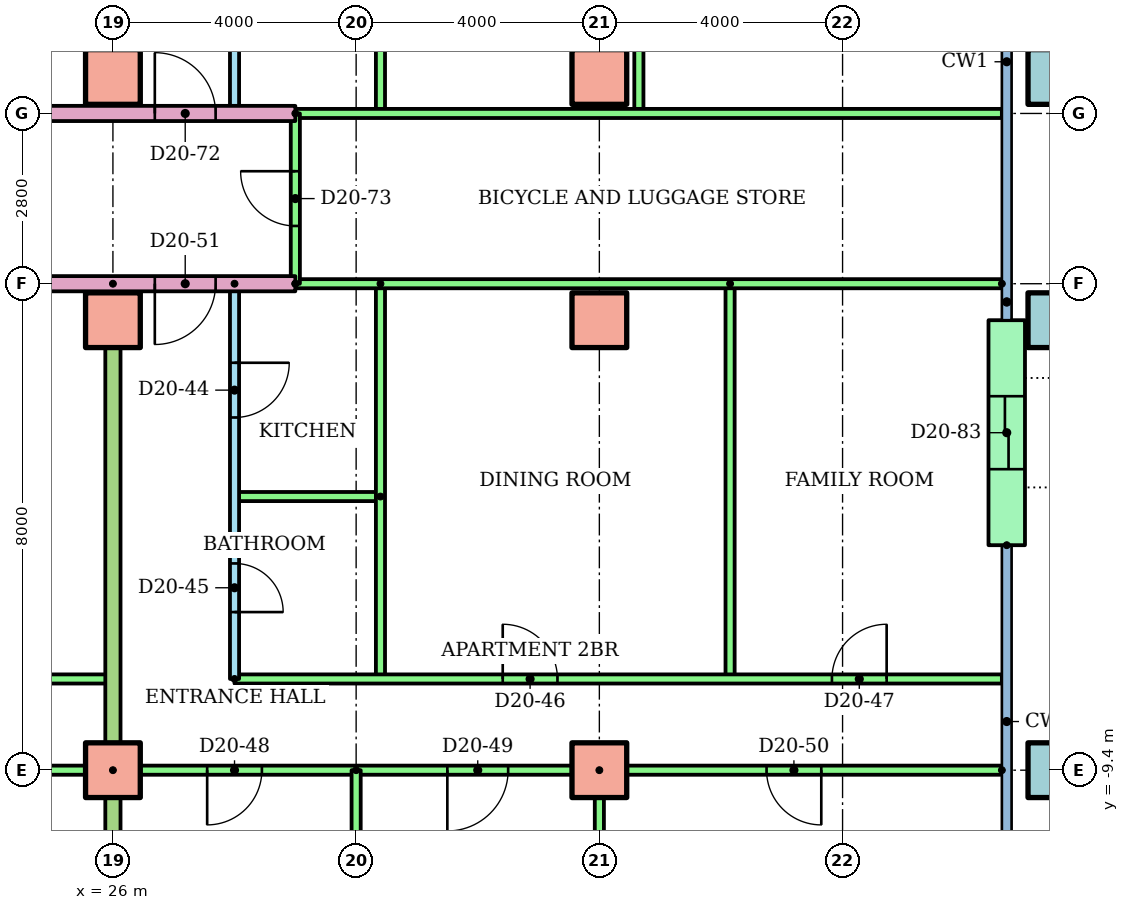
"""IFC4 building model, lengths in metres.
Left out: names, types, materials, properties, quantities, classifications, styles, units other than length and angle.
Written with IfcOpenShell. Run it as: python <this file> out.ifc"""

import sys

from ifc_helpers import new_model, si_unit, direction, frame, frame_2d, origin, origin_2d, place, context, subcontext, project, spatial, rectangle, hollow_rectangle, extrude, element, fill, save


model = new_model("IFC4")
c1 = context("Model", 3, precision=1e-05, world=origin(), true_north=direction((0.0, 1.0)))
c2 = subcontext(c1, "Body", "Model", "MODEL_VIEW")
j1 = project(units=[si_unit("LENGTHUNIT", "METRE"), si_unit("PLANEANGLEUNIT", "RADIAN")], contexts=[c1])
p1 = place(None, origin())
s1 = spatial("IfcSite", under=j1, at=p1, CompositionType="ELEMENT")
p2 = place(p1, origin())
s2 = spatial("IfcBuilding", under=s1, at=p2, CompositionType="ELEMENT")
p3 = place(p2, frame((0.0, 0.0, 80.7)))
s3 = spatial("IfcBuildingStorey", under=s2, at=p3, CompositionType="ELEMENT", Elevation=80.7)
for number, where in (
    (1, (26.0, -9.4, 0.0)),
    (2, (34.0, -9.4, 0.0)),
):
    element("IfcColumn", number, at=place(p3, frame(where)), inside=s3, PredefinedType="COLUMN", context=c2, shape_type="SweptSolid", body=[
        extrude(rectangle(XDim=0.9, YDim=0.9, at=origin_2d()), origin(), (0.0, 0.0, 1.0), 3.2),
    ])
p4 = place(p3, frame((41.5, -9.4, 0.0)))
e3 = element("IfcColumn", 3, at=p4, inside=s3, PredefinedType="COLUMN", context=c2, shape_type="SweptSolid", body=[
    extrude(hollow_rectangle(XDim=0.9, YDim=0.9, WallThickness=0.045, at=origin_2d()), origin(), (0.0, 0.0, 1.0), 3.2),
])
for number, where in (
    (4, (26.0, -2.0, 0.0)),
    (5, (34.0, -2.0, 0.0)),
):
    element("IfcColumn", number, at=place(p3, frame(where)), inside=s3, PredefinedType="COLUMN", context=c2, shape_type="SweptSolid", body=[
        extrude(rectangle(XDim=0.9, YDim=0.9, at=origin_2d()), origin(), (0.0, 0.0, 1.0), 3.2),
    ])
p5 = place(p3, frame((41.5, -2.0, 0.0)))
e6 = element("IfcColumn", 6, at=p5, inside=s3, PredefinedType="COLUMN", context=c2, shape_type="SweptSolid", body=[
    extrude(hollow_rectangle(XDim=0.9, YDim=0.9, WallThickness=0.045, at=origin_2d()), origin(), (0.0, 0.0, 1.0), 3.2),
])
for number, where in (
    (7, (26.0, 2.0, 0.0)),
    (8, (34.0, 2.0, 0.0)),
):
    element("IfcColumn", number, at=place(p3, frame(where)), inside=s3, PredefinedType="COLUMN", context=c2, shape_type="SweptSolid", body=[
        extrude(rectangle(XDim=0.9, YDim=0.9, at=origin_2d()), origin(), (0.0, 0.0, 1.0), 3.2),
    ])
p6 = place(p3, frame((41.5, 2.0, 0.0)))
e9 = element("IfcColumn", 9, at=p6, inside=s3, PredefinedType="COLUMN", context=c2, shape_type="SweptSolid", body=[
    extrude(hollow_rectangle(XDim=0.9, YDim=0.9, WallThickness=0.045, at=origin_2d()), origin(), (0.0, 0.0, 1.0), 3.2),
])
p7 = place(p3, frame((40.7, -5.7, 0.0), z_axis=(0.0, 0.0, 1.0), x_axis=(0.0, 1.0, 0.0)))
e10 = element("IfcWall", 10, at=p7, inside=s3, PredefinedType="STANDARD", context=c2, shape_type="SweptSolid", body=[
    extrude(rectangle(XDim=3.7, YDim=0.6, at=frame_2d((1.85, 0.0))), origin(), (0.0, 0.0, 1.0), 2.92),
])
p8 = place(p7, frame((1.25, 0.0, 0.0)))
e11 = element("IfcOpeningElement", 11, at=p8, cuts=e10, PredefinedType="OPENING", context=c2, shape_type="SweptSolid", body=[
    extrude(rectangle(XDim=1.2, YDim=2.1, at=frame_2d((0.6, 1.05))), frame((0.0, 0.31, 0.0), z_axis=(0.0, -1.0, 0.0), x_axis=(1.0, 0.0, 0.0)), (0.0, 0.0, 1.0), 0.62),
])
p9 = place(p3, frame((12.0, -7.9, 0.0)))
e12 = element("IfcWall", 12, at=p9, inside=s3, PredefinedType="PARTITIONING", context=c2, shape_type="SweptSolid", body=[
    extrude(rectangle(XDim=14.0, YDim=0.15, at=frame_2d((7.0, 0.0))), origin(), (0.0, 0.0, 1.0), 2.4),
])
p10 = place(p9, frame((3.45, 0.0, 0.0)))
e13 = element("IfcOpeningElement", 13, at=p10, cuts=e12, PredefinedType="OPENING", context=c2, shape_type="SweptSolid", body=[
    extrude(rectangle(XDim=0.9, YDim=2.1, at=frame_2d((0.45, 1.05))), frame((0.0, 0.085, 0.0), z_axis=(0.0, -1.0, 0.0), x_axis=(1.0, 0.0, 0.0)), (0.0, 0.0, 1.0), 0.17),
])
p11 = place(p9, frame((6.825, 0.0, 0.0)))
e14 = element("IfcOpeningElement", 14, at=p11, cuts=e12, PredefinedType="OPENING", context=c2, shape_type="SweptSolid", body=[
    extrude(rectangle(XDim=0.9, YDim=2.1, at=frame_2d((0.45, 1.05))), frame((0.0, 0.085, 0.0), z_axis=(0.0, -1.0, 0.0), x_axis=(1.0, 0.0, 0.0)), (0.0, 0.0, 1.0), 0.17),
])
p12 = place(p9, frame((11.125, 0.0, 0.0)))
e15 = element("IfcOpeningElement", 15, at=p12, cuts=e12, PredefinedType="OPENING", context=c2, shape_type="SweptSolid", body=[
    extrude(rectangle(XDim=0.9, YDim=2.1, at=frame_2d((0.45, 1.05))), frame((0.0, 0.085, 0.0), z_axis=(0.0, -1.0, 0.0), x_axis=(1.0, 0.0, 0.0)), (0.0, 0.0, 1.0), 0.17),
])
p13 = place(p3, frame((26.0, -9.4, 0.0), z_axis=(0.0, 0.0, 1.0), x_axis=(-1.0, 0.0, 0.0)))
e16 = element("IfcWall", 16, at=p13, inside=s3, PredefinedType="PARTITIONING", context=c2, shape_type="SweptSolid", body=[
    extrude(rectangle(XDim=16.0, YDim=0.15, at=frame_2d((8.0, 0.0))), origin(), (0.0, 0.0, 1.0), 2.4),
])
p14 = place(p13, frame((13.55, 0.0, 0.0)))
e17 = element("IfcOpeningElement", 17, at=p14, cuts=e16, PredefinedType="OPENING", context=c2, shape_type="SweptSolid", body=[
    extrude(rectangle(XDim=0.9, YDim=2.1, at=frame_2d((0.45, 1.05))), frame((0.0, 0.085, 0.0), z_axis=(0.0, -1.0, 0.0), x_axis=(1.0, 0.0, 0.0)), (0.0, 0.0, 1.0), 0.17),
])
p15 = place(p13, frame((9.55, 0.0, 0.0)))
e18 = element("IfcOpeningElement", 18, at=p15, cuts=e16, PredefinedType="OPENING", context=c2, shape_type="SweptSolid", body=[
    extrude(rectangle(XDim=0.9, YDim=2.1, at=frame_2d((0.45, 1.05))), frame((0.0, 0.085, 0.0), z_axis=(0.0, -1.0, 0.0), x_axis=(1.0, 0.0, 0.0)), (0.0, 0.0, 1.0), 0.17),
])
p16 = place(p13, frame((3.5, 0.0, 0.0)))
e19 = element("IfcOpeningElement", 19, at=p16, cuts=e16, PredefinedType="OPENING", context=c2, shape_type="SweptSolid", body=[
    extrude(rectangle(XDim=1.0, YDim=2.1, at=frame_2d((0.5, 1.05))), frame((0.0, 0.085, 0.0), z_axis=(0.0, -1.0, 0.0), x_axis=(1.0, 0.0, 0.0)), (0.0, 0.0, 1.0), 0.17),
])
p17 = place(p3, frame((28.0, -1.4, 0.0), z_axis=(0.0, 0.0, 1.0), x_axis=(0.0, -1.0, 0.0)))
e20 = element("IfcWall", 20, at=p17, inside=s3, PredefinedType="PARTITIONING", context=c2, shape_type="SweptSolid", body=[
    extrude(rectangle(XDim=6.5, YDim=0.15, at=frame_2d((3.25, 0.0))), origin(), (0.0, 0.0, 1.0), 2.4),
])
p18 = place(p17, frame((1.3, 0.0, 0.0)))
e21 = element("IfcOpeningElement", 21, at=p18, cuts=e20, PredefinedType="OPENING", context=c2, shape_type="SweptSolid", body=[
    extrude(rectangle(XDim=0.9, YDim=2.1, at=frame_2d((0.45, 1.05))), frame((0.0, 0.085, 0.0), z_axis=(0.0, -1.0, 0.0), x_axis=(1.0, 0.0, 0.0)), (0.0, 0.0, 1.0), 0.17),
])
p19 = place(p17, frame((4.6, 0.0, 0.0)))
e22 = element("IfcOpeningElement", 22, at=p19, cuts=e20, PredefinedType="OPENING", context=c2, shape_type="SweptSolid", body=[
    extrude(rectangle(XDim=0.8, YDim=2.1, at=frame_2d((0.4, 1.05))), frame((0.0, 0.085, 0.0), z_axis=(0.0, -1.0, 0.0), x_axis=(1.0, 0.0, 0.0)), (0.0, 0.0, 1.0), 0.17),
])
p20 = place(p3, frame((30.4, -4.9, 0.0), z_axis=(0.0, 0.0, 1.0), x_axis=(-1.0, 0.0, 0.0)))
e23 = element("IfcWall", 23, at=p20, inside=s3, PredefinedType="PARTITIONING", context=c2, shape_type="SweptSolid", body=[
    extrude(rectangle(XDim=2.4, YDim=0.15, at=frame_2d((1.2, 0.0))), origin(), (0.0, 0.0, 1.0), 2.4),
])
for number, where, z_axis, x_axis in (
    (24, (30.4, -1.4, 0.0), (0.0, 0.0, 1.0), (0.0, -1.0, 0.0)),
    (25, (36.15, -1.4, 0.0), (0.0, 0.0, 1.0), (0.0, -1.0, 0.0)),
):
    element("IfcWall", number, at=place(p3, frame(where, z_axis=z_axis, x_axis=x_axis)), inside=s3, PredefinedType="PARTITIONING", context=c2, shape_type="SweptSolid", body=[
        extrude(rectangle(XDim=6.5, YDim=0.15, at=frame_2d((3.25, 0.0))), origin(), (0.0, 0.0, 1.0), 2.4),
    ])
p21 = place(p3, frame((28.0, -7.9, 0.0)))
e26 = element("IfcWall", 26, at=p21, inside=s3, PredefinedType="PARTITIONING", context=c2, shape_type="SweptSolid", body=[
    extrude(rectangle(XDim=12.62, YDim=0.15, at=frame_2d((6.31, 0.0))), origin(), (0.0, 0.0, 1.0), 2.4),
])
p22 = place(p21, frame((4.411, 0.0, 0.0)))
e27 = element("IfcOpeningElement", 27, at=p22, cuts=e26, PredefinedType="OPENING", context=c2, shape_type="SweptSolid", body=[
    extrude(rectangle(XDim=0.9, YDim=2.1, at=frame_2d((0.45, 1.05))), frame((0.0, 0.085, 0.0), z_axis=(0.0, -1.0, 0.0), x_axis=(1.0, 0.0, 0.0)), (0.0, 0.0, 1.0), 0.17),
])
p23 = place(p21, frame((9.825, 0.0, 0.0)))
e28 = element("IfcOpeningElement", 28, at=p23, cuts=e26, PredefinedType="OPENING", context=c2, shape_type="SweptSolid", body=[
    extrude(rectangle(XDim=0.9, YDim=2.1, at=frame_2d((0.45, 1.05))), frame((0.0, 0.085, 0.0), z_axis=(0.0, -1.0, 0.0), x_axis=(1.0, 0.0, 0.0)), (0.0, 0.0, 1.0), 0.17),
])
p24 = place(p3, frame((40.62, -9.4, 0.0), z_axis=(0.0, 0.0, 1.0), x_axis=(-1.0, 0.0, 0.0)))
e29 = element("IfcWall", 29, at=p24, inside=s3, PredefinedType="PARTITIONING", context=c2, shape_type="SweptSolid", body=[
    extrude(rectangle(XDim=14.62, YDim=0.15, at=frame_2d((7.31, 0.0))), origin(), (0.0, 0.0, 1.0), 2.4),
])
p25 = place(p24, frame((12.17, 0.0, 0.0)))
e30 = element("IfcOpeningElement", 30, at=p25, cuts=e29, PredefinedType="OPENING", context=c2, shape_type="SweptSolid", body=[
    extrude(rectangle(XDim=0.9, YDim=2.1, at=frame_2d((0.45, 1.05))), frame((0.0, 0.085, 0.0), z_axis=(0.0, -1.0, 0.0), x_axis=(1.0, 0.0, 0.0)), (0.0, 0.0, 1.0), 0.17),
])
p26 = place(p24, frame((8.12, 0.0, 0.0)))
e31 = element("IfcOpeningElement", 31, at=p26, cuts=e29, PredefinedType="OPENING", context=c2, shape_type="SweptSolid", body=[
    extrude(rectangle(XDim=1.0, YDim=2.1, at=frame_2d((0.5, 1.05))), frame((0.0, 0.085, 0.0), z_axis=(0.0, -1.0, 0.0), x_axis=(1.0, 0.0, 0.0)), (0.0, 0.0, 1.0), 0.17),
])
p27 = place(p24, frame((2.97, 0.0, 0.0)))
e32 = element("IfcOpeningElement", 32, at=p27, cuts=e29, PredefinedType="OPENING", context=c2, shape_type="SweptSolid", body=[
    extrude(rectangle(XDim=0.9, YDim=2.1, at=frame_2d((0.45, 1.05))), frame((0.0, 0.085, 0.0), z_axis=(0.0, -1.0, 0.0), x_axis=(1.0, 0.0, 0.0)), (0.0, 0.0, 1.0), 0.17),
])
p28 = place(p3, frame((30.0, -9.4, 0.0), z_axis=(0.0, 0.0, 1.0), x_axis=(0.0, -1.0, 0.0)))
e33 = element("IfcWall", 33, at=p28, inside=s3, PredefinedType="PARTITIONING", context=c2, shape_type="SweptSolid", body=[
    extrude(rectangle(XDim=6.821, YDim=0.15, at=frame_2d((3.411, 0.0))), origin(), (0.0, 0.0, 1.0), 2.4),
])
p29 = place(p3, frame((34.0, -9.4, 0.0), z_axis=(0.0, 0.0, 1.0), x_axis=(0.0, -1.0, 0.0)))
e34 = element("IfcWall", 34, at=p29, inside=s3, PredefinedType="PARTITIONING", context=c2, shape_type="SweptSolid", body=[
    extrude(rectangle(XDim=6.81, YDim=0.15, at=frame_2d((3.405, 0.0))), origin(), (0.0, 0.0, 1.0), 2.4),
])
p30 = place(p3, frame((26.0, -1.4, 0.0), z_axis=(0.0, 0.0, 1.0), x_axis=(0.0, -1.0, 0.0)))
e35 = element("IfcWall", 35, at=p30, inside=s3, PredefinedType="PARTITIONING", context=c2, shape_type="SweptSolid", body=[
    extrude(rectangle(XDim=14.81, YDim=0.25, at=frame_2d((7.405, 0.0))), origin(), (0.0, 0.0, 1.0), 2.4),
])
p31 = place(p3, frame((29.0, -1.4, 0.0), z_axis=(0.0, 0.0, 1.0), x_axis=(-1.0, 0.0, 0.0)))
e36 = element("IfcWall", 36, at=p31, inside=s3, PredefinedType="PARTITIONING", context=c2, shape_type="SweptSolid", body=[
    extrude(rectangle(XDim=15.0, YDim=0.25, at=frame_2d((7.5, 0.0))), origin(), (0.0, 0.0, 1.0), 2.4),
])
p32 = place(p31, frame((1.311, 0.0, 0.0)))
e37 = element("IfcOpeningElement", 37, at=p32, cuts=e36, PredefinedType="OPENING", context=c2, shape_type="SweptSolid", body=[
    extrude(rectangle(XDim=1.0, YDim=2.1, at=frame_2d((0.5, 1.05))), frame((0.0, 0.135, 0.0), z_axis=(0.0, -1.0, 0.0), x_axis=(1.0, 0.0, 0.0)), (0.0, 0.0, 1.0), 0.27),
])
p33 = place(p3, frame((40.62, -1.4, 0.0), z_axis=(0.0, 0.0, 1.0), x_axis=(-1.0, 0.0, 0.0)))
e38 = element("IfcWall", 38, at=p33, inside=s3, PredefinedType="PARTITIONING", context=c2, shape_type="SweptSolid", body=[
    extrude(rectangle(XDim=11.62, YDim=0.15, at=frame_2d((5.81, 0.0))), origin(), (0.0, 0.0, 1.0), 2.4),
])
p34 = place(p3, frame((28.0, 10.3, 0.0), z_axis=(0.0, 0.0, 1.0), x_axis=(0.0, -1.0, 0.0)))
e39 = element("IfcWall", 39, at=p34, inside=s3, PredefinedType="PARTITIONING", context=c2, shape_type="SweptSolid", body=[
    extrude(rectangle(XDim=8.9, YDim=0.15, at=frame_2d((4.45, 0.0))), origin(), (0.0, 0.0, 1.0), 2.4),
])
p35 = place(p34, frame((5.95, 0.0, 0.0)))
e40 = element("IfcOpeningElement", 40, at=p35, cuts=e39, PredefinedType="OPENING", context=c2, shape_type="SweptSolid", body=[
    extrude(rectangle(XDim=0.9, YDim=2.1, at=frame_2d((0.45, 1.05))), frame((0.0, 0.085, 0.0), z_axis=(0.0, -1.0, 0.0), x_axis=(1.0, 0.0, 0.0)), (0.0, 0.0, 1.0), 0.17),
])
p36 = place(p34, frame((1.55, 0.0, 0.0)))
e41 = element("IfcOpeningElement", 41, at=p36, cuts=e39, PredefinedType="OPENING", context=c2, shape_type="SweptSolid", body=[
    extrude(rectangle(XDim=0.8, YDim=2.1, at=frame_2d((0.4, 1.05))), frame((0.0, 0.085, 0.0), z_axis=(0.0, -1.0, 0.0), x_axis=(1.0, 0.0, 0.0)), (0.0, 0.0, 1.0), 0.17),
])
for number, where, z_axis, x_axis in (
    (42, (30.4, 10.3, 0.0), (0.0, 0.0, 1.0), (0.0, -1.0, 0.0)),
    (43, (34.65, 10.3, 0.0), (0.0, 0.0, 1.0), (0.0, -1.0, 0.0)),
):
    element("IfcWall", number, at=place(p3, frame(where, z_axis=z_axis, x_axis=x_axis)), inside=s3, PredefinedType="PARTITIONING", context=c2, shape_type="SweptSolid", body=[
        extrude(rectangle(XDim=8.9, YDim=0.15, at=frame_2d((4.45, 0.0))), origin(), (0.0, 0.0, 1.0), 2.4),
    ])
p37 = place(p3, frame((26.0, 18.621, 0.0), z_axis=(0.0, 0.0, 1.0), x_axis=(0.0, -1.0, 0.0)))
e44 = element("IfcWall", 44, at=p37, inside=s3, PredefinedType="PARTITIONING", context=c2, shape_type="SweptSolid", body=[
    extrude(rectangle(XDim=17.221, YDim=0.25, at=frame_2d((8.611, 0.0))), origin(), (0.0, 0.0, 1.0), 2.4),
])
p38 = place(p3, frame((14.0, 1.4, 0.0)))
e45 = element("IfcWall", 45, at=p38, inside=s3, PredefinedType="PARTITIONING", context=c2, shape_type="SweptSolid", body=[
    extrude(rectangle(XDim=15.0, YDim=0.25, at=frame_2d((7.5, 0.0))), origin(), (0.0, 0.0, 1.0), 2.4),
])
p39 = place(p38, frame((0.5, 0.0, 0.0)))
e46 = element("IfcOpeningElement", 46, at=p39, cuts=e45, PredefinedType="OPENING", context=c2, shape_type="SweptSolid", body=[
    extrude(rectangle(XDim=1.0, YDim=2.1, at=frame_2d((0.5, 1.05))), frame((0.0, 0.135, 0.0), z_axis=(0.0, -1.0, 0.0), x_axis=(1.0, 0.0, 0.0)), (0.0, 0.0, 1.0), 0.27),
])
p40 = place(p38, frame((12.689, 0.0, 0.0)))
e47 = element("IfcOpeningElement", 47, at=p40, cuts=e45, PredefinedType="OPENING", context=c2, shape_type="SweptSolid", body=[
    extrude(rectangle(XDim=1.0, YDim=2.1, at=frame_2d((0.5, 1.05))), frame((0.0, 0.135, 0.0), z_axis=(0.0, -1.0, 0.0), x_axis=(1.0, 0.0, 0.0)), (0.0, 0.0, 1.0), 0.27),
])
p41 = place(p3, frame((29.0, 1.4, 0.0)))
e48 = element("IfcWall", 48, at=p41, inside=s3, PredefinedType="PARTITIONING", context=c2, shape_type="SweptSolid", body=[
    extrude(rectangle(XDim=11.62, YDim=0.15, at=frame_2d((5.81, 0.0))), origin(), (0.0, 0.0, 1.0), 2.4),
])
p42 = place(p3, frame((29.0, -1.4, 0.0), z_axis=(0.0, 0.0, 1.0), x_axis=(0.0, 1.0, 0.0)))
e49 = element("IfcWall", 49, at=p42, inside=s3, PredefinedType="PARTITIONING", context=c2, shape_type="SweptSolid", body=[
    extrude(rectangle(XDim=2.8, YDim=0.15, at=frame_2d((1.4, 0.0))), origin(), (0.0, 0.0, 1.0), 2.4),
])
p43 = place(p42, frame((0.95, 0.0, 0.0)))
e50 = element("IfcOpeningElement", 50, at=p43, cuts=e49, PredefinedType="OPENING", context=c2, shape_type="SweptSolid", body=[
    extrude(rectangle(XDim=0.9, YDim=2.1, at=frame_2d((0.45, 1.05))), frame((0.0, 0.085, 0.0), z_axis=(0.0, -1.0, 0.0), x_axis=(1.0, 0.0, 0.0)), (0.0, 0.0, 1.0), 0.17),
])
p44 = place(p18, origin())
e51 = element("IfcDoor", 51, at=p44, inside=s3, OperationType="SINGLE_SWING_LEFT", PredefinedType="DOOR", context=c2, shape_type="SweptSolid", body=[
    extrude(rectangle(XDim=0.9, YDim=2.1, at=frame_2d((0.45, 1.05))), frame((0.0, 0.025, 0.0), z_axis=(0.0, -1.0, 0.0), x_axis=(1.0, 0.0, 0.0)), (0.0, 0.0, 1.0), 0.05),
])
fill(e21, e51)
p45 = place(p19, origin())
e52 = element("IfcDoor", 52, at=p45, inside=s3, OperationType="SINGLE_SWING_RIGHT", PredefinedType="DOOR", context=c2, shape_type="SweptSolid", body=[
    extrude(rectangle(XDim=0.8, YDim=2.1, at=frame_2d((0.4, 1.05))), frame((0.0, 0.025, 0.0), z_axis=(0.0, -1.0, 0.0), x_axis=(1.0, 0.0, 0.0)), (0.0, 0.0, 1.0), 0.05),
])
fill(e22, e52)
p46 = place(p22, origin())
e53 = element("IfcDoor", 53, at=p46, inside=s3, OperationType="SINGLE_SWING_LEFT", PredefinedType="DOOR", context=c2, shape_type="SweptSolid", body=[
    extrude(rectangle(XDim=0.9, YDim=2.1, at=frame_2d((0.45, 1.05))), frame((0.0, 0.025, 0.0), z_axis=(0.0, -1.0, 0.0), x_axis=(1.0, 0.0, 0.0)), (0.0, 0.0, 1.0), 0.05),
])
fill(e27, e53)
p47 = place(p23, origin())
e54 = element("IfcDoor", 54, at=p47, inside=s3, OperationType="SINGLE_SWING_RIGHT", PredefinedType="DOOR", context=c2, shape_type="SweptSolid", body=[
    extrude(rectangle(XDim=0.9, YDim=2.1, at=frame_2d((0.45, 1.05))), frame((0.0, 0.025, 0.0), z_axis=(0.0, -1.0, 0.0), x_axis=(1.0, 0.0, 0.0)), (0.0, 0.0, 1.0), 0.05),
])
fill(e28, e54)
p48 = place(p25, origin())
e55 = element("IfcDoor", 55, at=p48, inside=s3, OperationType="SINGLE_SWING_RIGHT", PredefinedType="DOOR", context=c2, shape_type="SweptSolid", body=[
    extrude(rectangle(XDim=0.9, YDim=2.1, at=frame_2d((0.45, 1.05))), frame((0.0, 0.025, 0.0), z_axis=(0.0, -1.0, 0.0), x_axis=(1.0, 0.0, 0.0)), (0.0, 0.0, 1.0), 0.05),
])
fill(e30, e55)
p49 = place(p26, origin())
e56 = element("IfcDoor", 56, at=p49, inside=s3, OperationType="SINGLE_SWING_RIGHT", PredefinedType="DOOR", context=c2, shape_type="SweptSolid", body=[
    extrude(rectangle(XDim=1.0, YDim=2.1, at=frame_2d((0.5, 1.05))), frame((0.0, 0.025, 0.0), z_axis=(0.0, -1.0, 0.0), x_axis=(1.0, 0.0, 0.0)), (0.0, 0.0, 1.0), 0.05),
])
fill(e31, e56)
p50 = place(p27, origin())
e57 = element("IfcDoor", 57, at=p50, inside=s3, OperationType="SINGLE_SWING_LEFT", PredefinedType="DOOR", context=c2, shape_type="SweptSolid", body=[
    extrude(rectangle(XDim=0.9, YDim=2.1, at=frame_2d((0.45, 1.05))), frame((0.0, 0.025, 0.0), z_axis=(0.0, -1.0, 0.0), x_axis=(1.0, 0.0, 0.0)), (0.0, 0.0, 1.0), 0.05),
])
fill(e32, e57)
p51 = place(p32, origin())
e58 = element("IfcDoor", 58, at=p51, inside=s3, OperationType="SINGLE_SWING_RIGHT", PredefinedType="DOOR", context=c2, shape_type="SweptSolid", body=[
    extrude(rectangle(XDim=1.0, YDim=2.1, at=frame_2d((0.5, 1.05))), frame((0.0, 0.025, 0.0), z_axis=(0.0, -1.0, 0.0), x_axis=(1.0, 0.0, 0.0)), (0.0, 0.0, 1.0), 0.05),
])
fill(e37, e58)
p52 = place(p40, origin())
e59 = element("IfcDoor", 59, at=p52, inside=s3, OperationType="SINGLE_SWING_LEFT", PredefinedType="DOOR", context=c2, shape_type="SweptSolid", body=[
    extrude(rectangle(XDim=1.0, YDim=2.1, at=frame_2d((0.5, 1.05))), frame((0.0, 0.025, 0.0), z_axis=(0.0, -1.0, 0.0), x_axis=(1.0, 0.0, 0.0)), (0.0, 0.0, 1.0), 0.05),
])
fill(e47, e59)
p53 = place(p43, origin())
e60 = element("IfcDoor", 60, at=p53, inside=s3, OperationType="SINGLE_SWING_RIGHT", PredefinedType="DOOR", context=c2, shape_type="SweptSolid", body=[
    extrude(rectangle(XDim=0.9, YDim=2.1, at=frame_2d((0.45, 1.05))), frame((0.0, 0.025, 0.0), z_axis=(0.0, -1.0, 0.0), x_axis=(1.0, 0.0, 0.0)), (0.0, 0.0, 1.0), 0.05),
])
fill(e50, e60)
p54 = place(p8, origin())
e61 = element("IfcDoor", 61, at=p54, inside=s3, OperationType="SLIDING_TO_LEFT", PredefinedType="DOOR", context=c2, shape_type="SweptSolid", body=[
    extrude(rectangle(XDim=1.2, YDim=2.1, at=frame_2d((0.6, 1.05))), frame((0.0, 0.025, 0.0), z_axis=(0.0, -1.0, 0.0), x_axis=(1.0, 0.0, 0.0)), (0.0, 0.0, 1.0), 0.05),
])
fill(e11, e61)
save(model, sys.argv[1])
